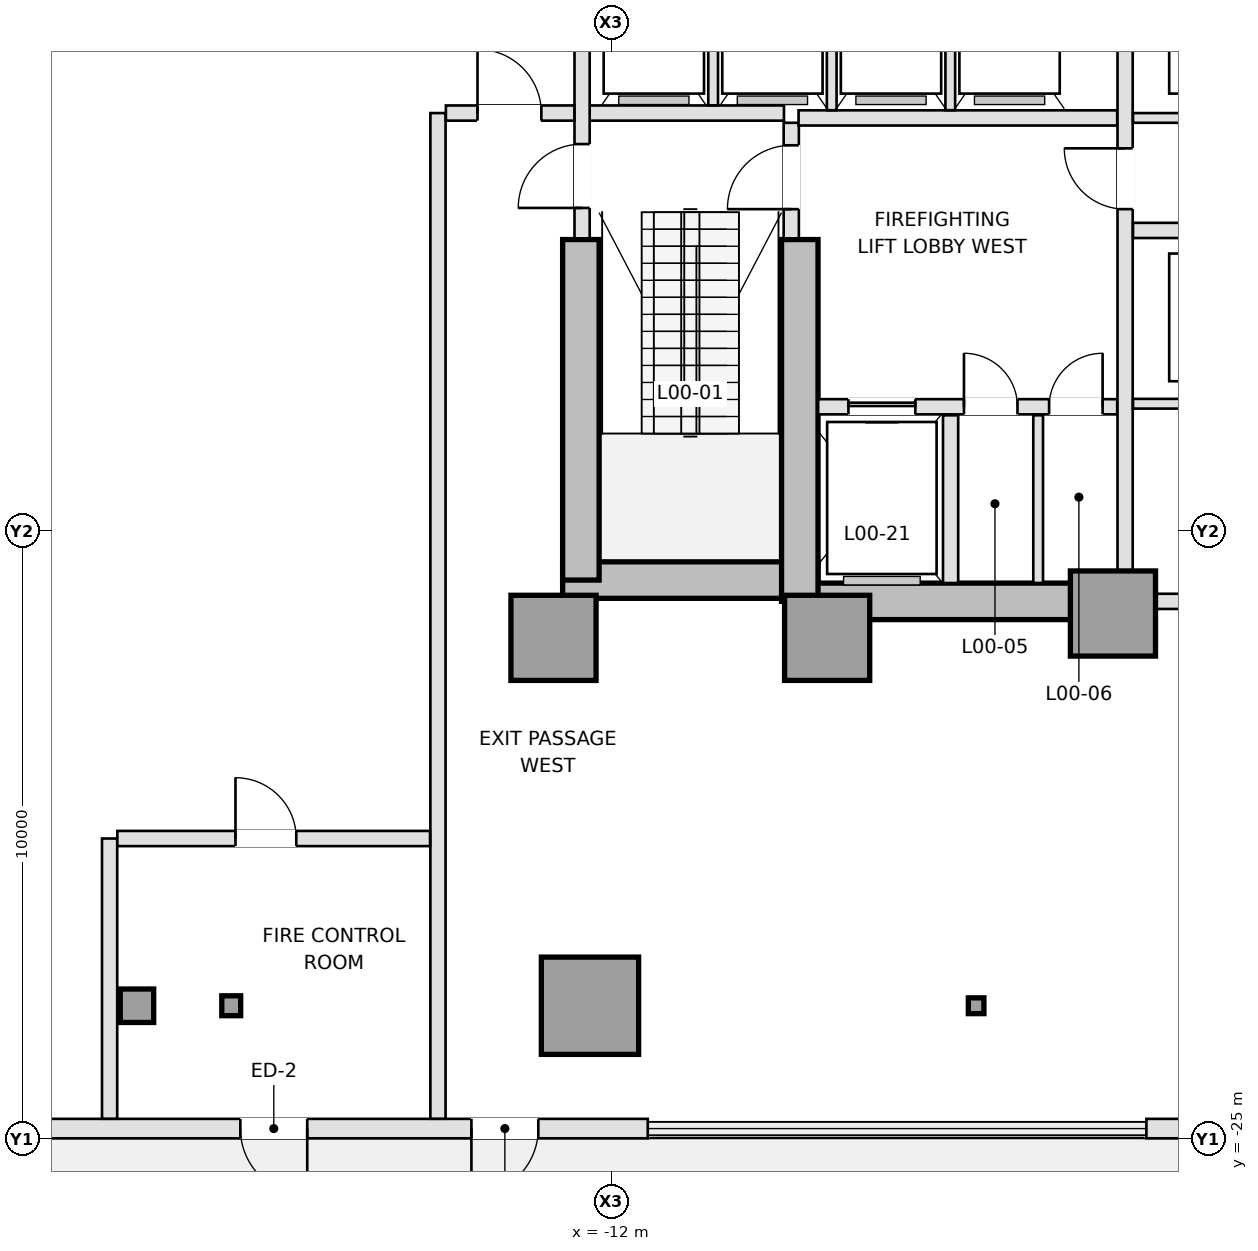
"""IFC4 building model, lengths in metres.
Left out: names, types, materials, properties, quantities, classifications, styles, units other than length and angle.
Written with IfcOpenShell. Run it as: python <this file> out.ifc"""

import sys

from ifc_helpers import new_model, si_unit, direction, frame, frame_2d, origin, origin_2d, place, context, subcontext, project, spatial, rectangle, i_section, extrude, element, fill, save


model = new_model("IFC4")
c1 = context("Model", 3, precision=1e-05, world=origin(), true_north=direction((0.0, 1.0)))
c2 = subcontext(c1, "Body", "Model", "MODEL_VIEW")
j1 = project(units=[si_unit("LENGTHUNIT", "METRE"), si_unit("PLANEANGLEUNIT", "RADIAN")], contexts=[c1])
p1 = place(None, origin())
s1 = spatial("IfcSite", under=j1, at=p1, CompositionType="ELEMENT")
p2 = place(p1, origin())
s2 = spatial("IfcBuilding", under=s1, at=p2, CompositionType="ELEMENT")
p3 = place(p2, origin())
s3 = spatial("IfcBuildingStorey", under=s2, at=p3, CompositionType="ELEMENT", Elevation=0.0)
p4 = place(p3, frame((-12.8, -15.8, 0.0), z_axis=(0.0, 0.0, 1.0), x_axis=(1.0, 0.0, 0.0)))
e1 = element("IfcWall", 1, at=p4, inside=s3, PredefinedType="SHEAR", context=c2, shape_type="SweptSolid", body=[
    extrude(rectangle(XDim=4.2, YDim=0.6, at=frame_2d((2.1, 0.0))), origin(), (0.0, 0.0, 1.0), 5.0),
])
p5 = place(p3, frame((-8.9, -16.15, 0.0), z_axis=(0.0, 0.0, 1.0), x_axis=(1.0, 0.0, 0.0)))
e2 = element("IfcWall", 2, at=p5, inside=s3, PredefinedType="SHEAR", context=c2, shape_type="SweptSolid", body=[
    extrude(rectangle(XDim=5.15, YDim=0.6, at=frame_2d((2.575, 0.0))), origin(), (0.0, 0.0, 1.0), 5.0),
])
p6 = place(p3, frame((-12.5, -15.8, 0.0), z_axis=(0.0, 0.0, 1.0), x_axis=(0.0, 1.0, 0.0)))
e3 = element("IfcWall", 3, at=p6, inside=s3, PredefinedType="SHEAR", context=c2, shape_type="SweptSolid", body=[
    extrude(rectangle(XDim=5.6, YDim=0.6, at=frame_2d((2.8, 0.0))), origin(), (0.0, 0.0, 1.0), 5.0),
])
p7 = place(p3, frame((-8.9, -16.15, 0.0), z_axis=(0.0, 0.0, 1.0), x_axis=(0.0, 1.0, 0.0)))
e4 = element("IfcWall", 4, at=p7, inside=s3, PredefinedType="SHEAR", context=c2, shape_type="SweptSolid", body=[
    extrude(rectangle(XDim=5.95, YDim=0.6, at=frame_2d((2.975, 0.0))), origin(), (0.0, 0.0, 1.0), 5.0),
])
for number, where, z_axis, x_axis in (
    (5, (-12.95, -16.75, 0.0), (0.0, 0.0, 1.0), (1.0, 0.0, 0.0)),
    (6, (-8.45, -16.75, 0.0), (0.0, 0.0, 1.0), (1.0, 0.0, 0.0)),
    (7, (-3.75, -16.35, 0.0), (0.0, 0.0, 1.0), (1.0, 0.0, 0.0)),
):
    element("IfcColumn", number, at=place(p3, frame(where, z_axis=z_axis, x_axis=x_axis)), inside=s3, PredefinedType="COLUMN", context=c2, shape_type="SweptSolid", body=[
        extrude(rectangle(XDim=1.4, YDim=1.4, at=origin_2d()), origin(), (0.0, 0.0, 1.0), 5.0),
    ])
p8 = place(p3, frame((-12.35, -22.8, 0.0), z_axis=(0.0, 0.0, 1.0), x_axis=(1.0, 0.0, 0.0)))
e8 = element("IfcColumn", 8, at=p8, inside=s3, PredefinedType="COLUMN", context=c2, shape_type="SweptSolid", body=[
    extrude(rectangle(XDim=1.6, YDim=1.6, at=origin_2d()), origin(), (0.0, 0.0, 1.0), 5.0),
])
p9 = place(p3, frame((-18.25, -22.8, 0.0), z_axis=(0.0, 0.0, 1.0), x_axis=(1.0, 0.0, 0.0)))
e9 = element("IfcColumn", 9, at=p9, inside=s3, PredefinedType="COLUMN", context=c2, shape_type="SweptSolid", body=[
    extrude(i_section(OverallWidth=0.311, OverallDepth=0.327, WebThickness=0.016, FlangeThickness=0.025, FilletRadius=0.017, at=origin_2d()), origin(), (0.0, 0.0, 1.0), 5.0),
])
p10 = place(p3, frame((-6.0, -22.8, 0.0), z_axis=(0.0, 0.0, 1.0), x_axis=(1.0, 0.0, 0.0)))
e10 = element("IfcColumn", 10, at=p10, inside=s3, PredefinedType="COLUMN", context=c2, shape_type="SweptSolid", body=[
    extrude(i_section(OverallWidth=0.256, OverallDepth=0.26, WebThickness=0.01, FlangeThickness=0.017, FilletRadius=0.014, at=origin_2d()), origin(), (0.0, 0.0, 1.0), 5.0),
])
p11 = place(p3, frame((-19.8, -22.8, 0.0), z_axis=(0.0, 0.0, 1.0), x_axis=(1.0, 0.0, 0.0)))
e11 = element("IfcColumn", 11, at=p11, inside=s3, PredefinedType="PILASTER", context=c2, shape_type="SweptSolid", body=[
    extrude(rectangle(XDim=0.55, YDim=0.55, at=origin_2d()), origin(), (0.0, 0.0, 1.0), 5.0),
])
p12 = place(p3, frame((3.2, -24.82, 0.0), z_axis=(0.0, 0.0, 1.0), x_axis=(-1.0, 0.0, 0.0)))
e12 = element("IfcWall", 12, at=p12, inside=s3, PredefinedType="STANDARD", context=c2, shape_type="SweptSolid", body=[
    extrude(rectangle(XDim=6.4, YDim=0.32, at=frame_2d((3.2, 0.0))), origin(), (0.0, 0.0, 1.0), 4.7),
])
p13 = place(p12, frame((2.2, 0.0, 0.0)))
e13 = element("IfcOpeningElement", 13, at=p13, cuts=e12, PredefinedType="OPENING", context=c2, shape_type="SweptSolid", body=[
    extrude(rectangle(XDim=2.0, YDim=2.4, at=frame_2d((1.0, 1.2))), frame((0.0, 0.17, 0.0), z_axis=(0.0, -1.0, 0.0), x_axis=(1.0, 0.0, 0.0)), (0.0, 0.0, 1.0), 0.34),
])
p14 = place(p3, frame((-11.4, -24.82, 0.0), z_axis=(0.0, 0.0, 1.0), x_axis=(-1.0, 0.0, 0.0)))
e14 = element("IfcWall", 14, at=p14, inside=s3, PredefinedType="STANDARD", context=c2, shape_type="SweptSolid", body=[
    extrude(rectangle(XDim=13.2, YDim=0.32, at=frame_2d((6.6, 0.0))), origin(), (0.0, 0.0, 1.0), 4.7),
])
p15 = place(p14, frame((1.8, 0.0, 0.0)))
e15 = element("IfcOpeningElement", 15, at=p15, cuts=e14, PredefinedType="OPENING", context=c2, shape_type="SweptSolid", body=[
    extrude(rectangle(XDim=1.1, YDim=2.2, at=frame_2d((0.55, 1.1))), frame((0.0, 0.17, 0.0), z_axis=(0.0, -1.0, 0.0), x_axis=(1.0, 0.0, 0.0)), (0.0, 0.0, 1.0), 0.34),
])
p16 = place(p14, frame((5.6, 0.0, 0.0)))
e16 = element("IfcOpeningElement", 16, at=p16, cuts=e14, PredefinedType="OPENING", context=c2, shape_type="SweptSolid", body=[
    extrude(rectangle(XDim=1.1, YDim=2.2, at=frame_2d((0.55, 1.1))), frame((0.0, 0.17, 0.0), z_axis=(0.0, -1.0, 0.0), x_axis=(1.0, 0.0, 0.0)), (0.0, 0.0, 1.0), 0.34),
])
p17 = place(p3, frame((-9.04, -10.18, 0.0), z_axis=(0.0, 0.0, 1.0), x_axis=(0.0, 1.0, 0.0)))
e17 = element("IfcWall", 17, at=p17, inside=s3, PredefinedType="PARTITIONING", context=c2, shape_type="SweptSolid", body=[
    extrude(rectangle(XDim=1.9, YDim=0.25, at=frame_2d((0.95, 0.0))), origin(), (0.0, 0.0, 1.0), 4.7),
])
p18 = place(p17, frame((0.48, 0.0, 0.0)))
e18 = element("IfcOpeningElement", 18, at=p18, cuts=e17, PredefinedType="OPENING", context=c2, shape_type="SweptSolid", body=[
    extrude(rectangle(XDim=1.05, YDim=2.15, at=frame_2d((0.525, 1.075))), frame((0.0, 0.135, 0.0), z_axis=(0.0, -1.0, 0.0), x_axis=(1.0, 0.0, 0.0)), (0.0, 0.0, 1.0), 0.27),
])
p19 = place(p3, frame((-12.38, -8.12, 0.0), z_axis=(0.0, 0.0, 1.0), x_axis=(1.0, 0.0, 0.0)))
e19 = element("IfcWall", 19, at=p19, inside=s3, PredefinedType="PARTITIONING", context=c2, shape_type="SweptSolid", body=[
    extrude(rectangle(XDim=3.22, YDim=0.25, at=frame_2d((1.61, 0.0))), origin(), (0.0, 0.0, 1.0), 4.7),
])
p20 = place(p3, frame((-12.48, -10.18, 0.0), z_axis=(0.0, 0.0, 1.0), x_axis=(0.0, 1.0, 0.0)))
e20 = element("IfcWall", 20, at=p20, inside=s3, PredefinedType="PARTITIONING", context=c2, shape_type="SweptSolid", body=[
    extrude(rectangle(XDim=4.678, YDim=0.25, at=frame_2d((2.339, 0.0))), origin(), (0.0, 0.0, 1.0), 4.7),
])
p21 = place(p20, frame((0.5, 0.0, 0.0)))
e21 = element("IfcOpeningElement", 21, at=p21, cuts=e20, PredefinedType="OPENING", context=c2, shape_type="SweptSolid", body=[
    extrude(rectangle(XDim=1.05, YDim=2.15, at=frame_2d((0.525, 1.075))), frame((0.0, 0.135, 0.0), z_axis=(0.0, -1.0, 0.0), x_axis=(1.0, 0.0, 0.0)), (0.0, 0.0, 1.0), 0.27),
])
p22 = place(p3, frame((-8.598, -12.95, 0.0), z_axis=(0.0, 0.0, 1.0), x_axis=(1.0, 0.0, 0.0)))
e22 = element("IfcWall", 22, at=p22, inside=s3, PredefinedType="PARTITIONING", context=c2, shape_type="SweptSolid", body=[
    extrude(rectangle(XDim=4.918, YDim=0.25, at=frame_2d((2.459, 0.0))), origin(), (0.0, 0.0, 1.0), 4.7),
])
p23 = place(p22, frame((0.498, 0.0, 0.0)))
e23 = element("IfcOpeningElement", 23, at=p23, cuts=e22, PredefinedType="OPENING", context=c2, shape_type="SweptSolid", body=[
    extrude(rectangle(XDim=1.1, YDim=2.15, at=frame_2d((0.55, 1.075))), frame((0.0, 0.135, 0.0), z_axis=(0.0, -1.0, 0.0), x_axis=(1.0, 0.0, 0.0)), (0.0, 0.0, 1.0), 0.27),
])
p24 = place(p22, frame((2.398, 0.0, 0.0)))
e24 = element("IfcOpeningElement", 24, at=p24, cuts=e22, PredefinedType="OPENING", context=c2, shape_type="SweptSolid", body=[
    extrude(rectangle(XDim=0.88, YDim=2.1, at=frame_2d((0.44, 1.05))), frame((0.0, 0.135, 0.0), z_axis=(0.0, -1.0, 0.0), x_axis=(1.0, 0.0, 0.0)), (0.0, 0.0, 1.0), 0.27),
])
p25 = place(p22, frame((3.798, 0.0, 0.0)))
e25 = element("IfcOpeningElement", 25, at=p25, cuts=e22, PredefinedType="OPENING", context=c2, shape_type="SweptSolid", body=[
    extrude(rectangle(XDim=0.88, YDim=2.1, at=frame_2d((0.44, 1.05))), frame((0.0, 0.135, 0.0), z_axis=(0.0, -1.0, 0.0), x_axis=(1.0, 0.0, 0.0)), (0.0, 0.0, 1.0), 0.27),
])
p26 = place(p3, frame((-6.42, -15.848, 0.0), z_axis=(0.0, 0.0, 1.0), x_axis=(0.0, 1.0, 0.0)))
e26 = element("IfcWall", 26, at=p26, inside=s3, PredefinedType="PARTITIONING", context=c2, shape_type="SweptSolid", body=[
    extrude(rectangle(XDim=2.758, YDim=0.25, at=frame_2d((1.379, 0.0))), origin(), (0.0, 0.0, 1.0), 4.7),
])
p27 = place(p3, frame((-4.98, -15.848, 0.0), z_axis=(0.0, 0.0, 1.0), x_axis=(0.0, 1.0, 0.0)))
e27 = element("IfcWall", 27, at=p27, inside=s3, PredefinedType="PARTITIONING", context=c2, shape_type="SweptSolid", body=[
    extrude(rectangle(XDim=2.758, YDim=0.16, at=frame_2d((1.379, 0.0))), origin(), (0.0, 0.0, 1.0), 4.7),
])
p28 = place(p3, frame((-8.92, -8.2, 0.0), z_axis=(0.0, 0.0, 1.0), x_axis=(1.0, 0.0, 0.0)))
e28 = element("IfcWall", 28, at=p28, inside=s3, PredefinedType="PARTITIONING", context=c2, shape_type="SweptSolid", body=[
    extrude(rectangle(XDim=5.24, YDim=0.25, at=frame_2d((2.62, 0.0))), origin(), (0.0, 0.0, 1.0), 4.7),
])
p29 = place(p3, frame((-3.55, -15.648, 0.0), z_axis=(0.0, 0.0, 1.0), x_axis=(0.0, 1.0, 0.0)))
e29 = element("IfcWall", 29, at=p29, inside=s3, PredefinedType="PARTITIONING", context=c2, shape_type="SweptSolid", body=[
    extrude(rectangle(XDim=10.146, YDim=0.25, at=frame_2d((5.073, 0.0))), origin(), (0.0, 0.0, 1.0), 4.7),
])
p30 = place(p29, frame((5.948, 0.0, 0.0)))
e30 = element("IfcOpeningElement", 30, at=p30, cuts=e29, PredefinedType="OPENING", context=c2, shape_type="SweptSolid", body=[
    extrude(rectangle(XDim=1.0, YDim=2.15, at=frame_2d((0.5, 1.075))), frame((0.0, 0.135, 0.0), z_axis=(0.0, -1.0, 0.0), x_axis=(1.0, 0.0, 0.0)), (0.0, 0.0, 1.0), 0.27),
])
p31 = place(p3, frame((-10.325, -7.993, 0.0), z_axis=(0.0, 0.0, 1.0), x_axis=(0.0, 1.0, 0.0)))
e31 = element("IfcWall", 31, at=p31, inside=s3, PredefinedType="PARTITIONING", context=c2, shape_type="SweptSolid", body=[
    extrude(rectangle(XDim=2.653, YDim=0.16, at=frame_2d((1.326, 0.0))), origin(), (0.0, 0.0, 1.0), 4.7),
])
for number, where, z_axis, x_axis in (
    (32, (-8.375, -8.073, 0.0), (0.0, 0.0, 1.0), (0.0, 1.0, 0.0)),
    (33, (-6.425, -8.073, 0.0), (0.0, 0.0, 1.0), (0.0, 1.0, 0.0)),
):
    element("IfcWall", number, at=place(p3, frame(where, z_axis=z_axis, x_axis=x_axis)), inside=s3, PredefinedType="PARTITIONING", context=c2, shape_type="SweptSolid", body=[
        extrude(rectangle(XDim=2.733, YDim=0.16, at=frame_2d((1.366, 0.0))), origin(), (0.0, 0.0, 1.0), 4.7),
    ])
p32 = place(p3, frame((-3.048, -16.15, 0.0), z_axis=(0.0, 0.0, 1.0), x_axis=(1.0, 0.0, 0.0)))
e34 = element("IfcWall", 34, at=p32, inside=s3, PredefinedType="PARTITIONING", context=c2, shape_type="SweptSolid", body=[
    extrude(rectangle(XDim=6.096, YDim=0.25, at=frame_2d((3.048, 0.0))), origin(), (0.0, 0.0, 1.0), 3.676),
])
p33 = place(p3, frame((-3.42, -8.2, 0.0), z_axis=(0.0, 0.0, 1.0), x_axis=(1.0, 0.0, 0.0)))
e35 = element("IfcWall", 35, at=p33, inside=s3, PredefinedType="PARTITIONING", context=c2, shape_type="SweptSolid", body=[
    extrude(rectangle(XDim=2.47, YDim=0.16, at=frame_2d((1.235, 0.0))), origin(), (0.0, 0.0, 1.0), 4.7),
])
p34 = place(p3, frame((-3.42, -10.05, 0.0), z_axis=(0.0, 0.0, 1.0), x_axis=(1.0, 0.0, 0.0)))
e36 = element("IfcWall", 36, at=p34, inside=s3, PredefinedType="PARTITIONING", context=c2, shape_type="SweptSolid", body=[
    extrude(rectangle(XDim=2.47, YDim=0.25, at=frame_2d((1.235, 0.0))), origin(), (0.0, 0.0, 1.0), 4.7),
])
p35 = place(p34, frame((0.92, 0.0, 0.0)))
e37 = element("IfcOpeningElement", 37, at=p35, cuts=e36, PredefinedType="OPENING", context=c2, shape_type="SweptSolid", body=[
    extrude(rectangle(XDim=1.0, YDim=2.15, at=frame_2d((0.5, 1.075))), frame((0.0, 0.135, 0.0), z_axis=(0.0, -1.0, 0.0), x_axis=(1.0, 0.0, 0.0)), (0.0, 0.0, 1.0), 0.27),
])
p36 = place(p3, frame((-3.42, -12.9, 0.0), z_axis=(0.0, 0.0, 1.0), x_axis=(1.0, 0.0, 0.0)))
e38 = element("IfcWall", 38, at=p36, inside=s3, PredefinedType="PARTITIONING", context=c2, shape_type="SweptSolid", body=[
    extrude(rectangle(XDim=6.84, YDim=0.16, at=frame_2d((3.42, 0.0))), origin(), (0.0, 0.0, 1.0), 4.7),
])
p37 = place(p36, frame((2.98, 0.0, 0.0)))
e39 = element("IfcOpeningElement", 39, at=p37, cuts=e38, PredefinedType="OPENING", context=c2, shape_type="SweptSolid", body=[
    extrude(rectangle(XDim=0.88, YDim=2.12, at=frame_2d((0.44, 1.06))), frame((0.0, 0.09, 0.0), z_axis=(0.0, -1.0, 0.0), x_axis=(1.0, 0.0, 0.0)), (0.0, 0.0, 1.0), 0.18),
])
p38 = place(p3, frame((-14.85, -24.658, 0.0), z_axis=(0.0, 0.0, 1.0), x_axis=(0.0, 1.0, 0.0)))
e40 = element("IfcWall", 40, at=p38, inside=s3, PredefinedType="PARTITIONING", context=c2, shape_type="SweptSolid", body=[
    extrude(rectangle(XDim=16.538, YDim=0.25, at=frame_2d((8.269, 0.0))), origin(), (0.0, 0.0, 1.0), 4.7),
])
p39 = place(p3, frame((-14.72, -8.12, 0.0), z_axis=(0.0, 0.0, 1.0), x_axis=(1.0, 0.0, 0.0)))
e41 = element("IfcWall", 41, at=p39, inside=s3, PredefinedType="PARTITIONING", context=c2, shape_type="SweptSolid", body=[
    extrude(rectangle(XDim=2.113, YDim=0.25, at=frame_2d((1.057, 0.0))), origin(), (0.0, 0.0, 1.0), 4.7),
])
p40 = place(p39, frame((0.52, 0.0, 0.0)))
e42 = element("IfcOpeningElement", 42, at=p40, cuts=e41, PredefinedType="OPENING", context=c2, shape_type="SweptSolid", body=[
    extrude(rectangle(XDim=1.05, YDim=2.15, at=frame_2d((0.525, 1.075))), frame((0.0, 0.135, 0.0), z_axis=(0.0, -1.0, 0.0), x_axis=(1.0, 0.0, 0.0)), (0.0, 0.0, 1.0), 0.27),
])
p41 = place(p3, frame((-20.25, -24.658, 0.0), z_axis=(0.0, 0.0, 1.0), x_axis=(0.0, 1.0, 0.0)))
e43 = element("IfcWall", 43, at=p41, inside=s3, PredefinedType="PARTITIONING", context=c2, shape_type="SweptSolid", body=[
    extrude(rectangle(XDim=4.608, YDim=0.25, at=frame_2d((2.304, 0.0))), origin(), (0.0, 0.0, 1.0), 4.7),
])
p42 = place(p3, frame((-20.123, -20.05, 0.0), z_axis=(0.0, 0.0, 1.0), x_axis=(1.0, 0.0, 0.0)))
e44 = element("IfcWall", 44, at=p42, inside=s3, PredefinedType="PARTITIONING", context=c2, shape_type="SweptSolid", body=[
    extrude(rectangle(XDim=5.143, YDim=0.25, at=frame_2d((2.572, 0.0))), origin(), (0.0, 0.0, 1.0), 4.7),
])
p43 = place(p42, frame((1.943, 0.0, 0.0)))
e45 = element("IfcOpeningElement", 45, at=p43, cuts=e44, PredefinedType="OPENING", context=c2, shape_type="SweptSolid", body=[
    extrude(rectangle(XDim=1.0, YDim=2.15, at=frame_2d((0.5, 1.075))), frame((0.0, 0.135, 0.0), z_axis=(0.0, -1.0, 0.0), x_axis=(1.0, 0.0, 0.0)), (0.0, 0.0, 1.0), 0.27),
])
p44 = place(p15, origin())
e46 = element("IfcDoor", 46, at=p44, inside=s3, OperationType="SINGLE_SWING_RIGHT", PredefinedType="DOOR", context=c2, shape_type="SweptSolid", body=[
    extrude(rectangle(XDim=1.1, YDim=2.2, at=frame_2d((0.55, 1.1))), frame((0.0, 0.025, 0.0), z_axis=(0.0, -1.0, 0.0), x_axis=(1.0, 0.0, 0.0)), (0.0, 0.0, 1.0), 0.05),
])
fill(e15, e46)
p45 = place(p16, origin())
e47 = element("IfcDoor", 47, at=p45, inside=s3, OperationType="SINGLE_SWING_LEFT", PredefinedType="DOOR", context=c2, shape_type="SweptSolid", body=[
    extrude(rectangle(XDim=1.1, YDim=2.2, at=frame_2d((0.55, 1.1))), frame((0.0, 0.025, 0.0), z_axis=(0.0, -1.0, 0.0), x_axis=(1.0, 0.0, 0.0)), (0.0, 0.0, 1.0), 0.05),
])
fill(e16, e47)
p46 = place(p23, origin())
e48 = element("IfcDoor", 48, at=p46, inside=s3, OperationType="SLIDING_TO_LEFT", PredefinedType="DOOR", context=c2, shape_type="SweptSolid", body=[
    extrude(rectangle(XDim=1.1, YDim=2.15, at=frame_2d((0.55, 1.075))), frame((0.0, 0.025, 0.0), z_axis=(0.0, -1.0, 0.0), x_axis=(1.0, 0.0, 0.0)), (0.0, 0.0, 1.0), 0.05),
])
fill(e23, e48)
p47 = place(p18, origin())
e49 = element("IfcDoor", 49, at=p47, inside=s3, OperationType="SINGLE_SWING_LEFT", PredefinedType="DOOR", context=c2, shape_type="SweptSolid", body=[
    extrude(rectangle(XDim=1.05, YDim=2.15, at=frame_2d((0.525, 1.075))), frame((0.0, 0.025, 0.0), z_axis=(0.0, -1.0, 0.0), x_axis=(1.0, 0.0, 0.0)), (0.0, 0.0, 1.0), 0.05),
])
fill(e18, e49)
p48 = place(p24, origin())
e50 = element("IfcDoor", 50, at=p48, inside=s3, OperationType="SINGLE_SWING_LEFT", PredefinedType="TRAPDOOR", context=c2, shape_type="SweptSolid", body=[
    extrude(rectangle(XDim=0.88, YDim=2.1, at=frame_2d((0.44, 1.05))), frame((0.0, 0.025, 0.0), z_axis=(0.0, -1.0, 0.0), x_axis=(1.0, 0.0, 0.0)), (0.0, 0.0, 1.0), 0.05),
])
fill(e24, e50)
p49 = place(p25, origin())
e51 = element("IfcDoor", 51, at=p49, inside=s3, OperationType="SINGLE_SWING_RIGHT", PredefinedType="TRAPDOOR", context=c2, shape_type="SweptSolid", body=[
    extrude(rectangle(XDim=0.88, YDim=2.1, at=frame_2d((0.44, 1.05))), frame((0.0, 0.025, 0.0), z_axis=(0.0, -1.0, 0.0), x_axis=(1.0, 0.0, 0.0)), (0.0, 0.0, 1.0), 0.05),
])
fill(e25, e51)
p50 = place(p30, origin())
e52 = element("IfcDoor", 52, at=p50, inside=s3, OperationType="SINGLE_SWING_RIGHT", PredefinedType="DOOR", context=c2, shape_type="SweptSolid", body=[
    extrude(rectangle(XDim=1.0, YDim=2.15, at=frame_2d((0.5, 1.075))), frame((0.0, 0.025, 0.0), z_axis=(0.0, -1.0, 0.0), x_axis=(1.0, 0.0, 0.0)), (0.0, 0.0, 1.0), 0.05),
])
fill(e30, e52)
p51 = place(p40, origin())
e53 = element("IfcDoor", 53, at=p51, inside=s3, OperationType="SINGLE_SWING_LEFT", PredefinedType="DOOR", context=c2, shape_type="SweptSolid", body=[
    extrude(rectangle(XDim=1.05, YDim=2.15, at=frame_2d((0.525, 1.075))), frame((0.0, 0.025, 0.0), z_axis=(0.0, -1.0, 0.0), x_axis=(1.0, 0.0, 0.0)), (0.0, 0.0, 1.0), 0.05),
])
fill(e42, e53)
p52 = place(p43, origin())
e54 = element("IfcDoor", 54, at=p52, inside=s3, OperationType="SINGLE_SWING_LEFT", PredefinedType="DOOR", context=c2, shape_type="SweptSolid", body=[
    extrude(rectangle(XDim=1.0, YDim=2.15, at=frame_2d((0.5, 1.075))), frame((0.0, 0.025, 0.0), z_axis=(0.0, -1.0, 0.0), x_axis=(1.0, 0.0, 0.0)), (0.0, 0.0, 1.0), 0.05),
])
fill(e45, e54)
p53 = place(p21, origin())
e55 = element("IfcDoor", 55, at=p53, inside=s3, OperationType="SINGLE_SWING_LEFT", PredefinedType="DOOR", context=c2, shape_type="SweptSolid", body=[
    extrude(rectangle(XDim=1.05, YDim=2.15, at=frame_2d((0.525, 1.075))), frame((0.0, 0.025, 0.0), z_axis=(0.0, -1.0, 0.0), x_axis=(1.0, 0.0, 0.0)), (0.0, 0.0, 1.0), 0.05),
])
fill(e21, e55)
save(model, sys.argv[1])
